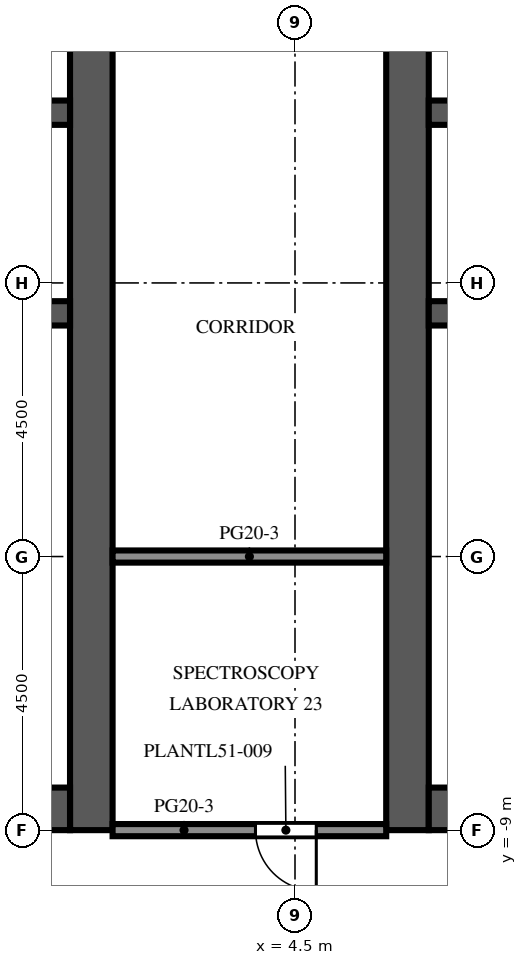
"""IFC4 building model, lengths in metres.
Left out: names, types, materials, properties, quantities, classifications, styles, units other than length and angle.
Written with IfcOpenShell. Run it as: python <this file> out.ifc"""

import sys

from ifc_helpers import new_model, si_unit, direction, frame, frame_2d, origin, place, context, subcontext, project, spatial, rectangle, extrude, element, fill, save


model = new_model("IFC4")
c1 = context("Model", 3, precision=1e-05, world=origin(), true_north=direction((0.0, 1.0)))
c2 = subcontext(c1, "Body", "Model", "MODEL_VIEW")
j1 = project(units=[si_unit("LENGTHUNIT", "METRE"), si_unit("PLANEANGLEUNIT", "RADIAN")], contexts=[c1])
p1 = place(None, origin())
s1 = spatial("IfcSite", under=j1, at=p1, CompositionType="ELEMENT")
p2 = place(p1, origin())
s2 = spatial("IfcBuilding", under=s1, at=p2, CompositionType="ELEMENT")
p3 = place(p2, frame((0.0, 0.0, 226.2)))
s3 = spatial("IfcBuildingStorey", under=s2, at=p3, CompositionType="ELEMENT", Elevation=226.2)
p4 = place(p3, frame((1.15, -9.0, 0.0), z_axis=(0.0, 0.0, 1.0), x_axis=(0.0, 1.0, 0.0)))
e1 = element("IfcWall", 1, at=p4, inside=s3, PredefinedType="SHEAR", context=c2, shape_type="SweptSolid", body=[
    extrude(rectangle(XDim=27.5, YDim=0.7, at=frame_2d((13.75, 0.0))), origin(), (0.0, 0.0, 1.0), 5.4),
])
p5 = place(p4, frame((12.55, 0.0, 0.0)))
e2 = element("IfcOpeningElement", 2, at=p5, cuts=e1, PredefinedType="OPENING", context=c2, shape_type="SweptSolid", body=[
    extrude(rectangle(XDim=2.4, YDim=2.4, at=frame_2d((1.2, 1.2))), frame((0.0, 0.36, 0.0), z_axis=(0.0, -1.0, 0.0), x_axis=(1.0, 0.0, 0.0)), (0.0, 0.0, 1.0), 0.72),
])
p6 = place(p4, frame((5.46, 0.0, 0.0)))
e3 = element("IfcOpeningElement", 3, at=p6, cuts=e1, PredefinedType="OPENING", context=c2, shape_type="SweptSolid", body=[
    extrude(rectangle(XDim=0.968, YDim=2.1, at=frame_2d((0.484, 1.05))), frame((0.0, 0.36, 0.0), z_axis=(0.0, -1.0, 0.0), x_axis=(1.0, 0.0, 0.0)), (0.0, 0.0, 1.0), 0.72),
])
p7 = place(p4, frame((23.54, 0.0, 0.0)))
e4 = element("IfcOpeningElement", 4, at=p7, cuts=e1, PredefinedType="OPENING", context=c2, shape_type="SweptSolid", body=[
    extrude(rectangle(XDim=1.2, YDim=2.1, at=frame_2d((0.6, 1.05))), frame((0.0, 0.36, 0.0), z_axis=(0.0, -1.0, 0.0), x_axis=(1.0, 0.0, 0.0)), (0.0, 0.0, 1.0), 0.72),
])
p8 = place(p3, frame((-9.8, -8.65, 0.0), z_axis=(0.0, 0.0, 1.0), x_axis=(1.0, 0.0, 0.0)))
e5 = element("IfcWall", 5, at=p8, inside=s3, PredefinedType="SHEAR", context=c2, shape_type="SweptSolid", body=[
    extrude(rectangle(XDim=10.6, YDim=0.7, at=frame_2d((5.3, 0.0))), origin(), (0.0, 0.0, 1.0), 5.4),
])
p9 = place(p3, frame((-9.8, -0.5, 0.0), z_axis=(0.0, 0.0, 1.0), x_axis=(1.0, 0.0, 0.0)))
e6 = element("IfcWall", 6, at=p9, inside=s3, PredefinedType="SHEAR", context=c2, shape_type="SweptSolid", body=[
    extrude(rectangle(XDim=10.6, YDim=0.4, at=frame_2d((5.3, 0.0))), origin(), (0.0, 0.0, 1.0), 5.4),
])
p10 = place(p3, frame((-9.8, 2.8, 0.0), z_axis=(0.0, 0.0, 1.0), x_axis=(1.0, 0.0, 0.0)))
e7 = element("IfcWall", 7, at=p10, inside=s3, PredefinedType="SHEAR", context=c2, shape_type="SweptSolid", body=[
    extrude(rectangle(XDim=10.6, YDim=0.4, at=frame_2d((5.3, 0.0))), origin(), (0.0, 0.0, 1.0), 5.4),
])
p11 = place(p10, frame((0.688, 0.0, 0.0)))
e8 = element("IfcOpeningElement", 8, at=p11, cuts=e7, PredefinedType="OPENING", context=c2, shape_type="SweptSolid", body=[
    extrude(rectangle(XDim=1.1, YDim=2.1, at=frame_2d((0.55, 1.05))), frame((0.0, 0.21, 0.0), z_axis=(0.0, -1.0, 0.0), x_axis=(1.0, 0.0, 0.0)), (0.0, 0.0, 1.0), 0.42),
])
p12 = place(p10, frame((3.438, 0.0, 0.0)))
e9 = element("IfcOpeningElement", 9, at=p12, cuts=e7, PredefinedType="OPENING", context=c2, shape_type="SweptSolid", body=[
    extrude(rectangle(XDim=1.1, YDim=2.1, at=frame_2d((0.55, 1.05))), frame((0.0, 0.21, 0.0), z_axis=(0.0, -1.0, 0.0), x_axis=(1.0, 0.0, 0.0)), (0.0, 0.0, 1.0), 0.42),
])
p13 = place(p10, frame((6.113, 0.0, 0.0)))
e10 = element("IfcOpeningElement", 10, at=p13, cuts=e7, PredefinedType="OPENING", context=c2, shape_type="SweptSolid", body=[
    extrude(rectangle(XDim=1.0, YDim=2.1, at=frame_2d((0.5, 1.05))), frame((0.0, 0.21, 0.0), z_axis=(0.0, -1.0, 0.0), x_axis=(1.0, 0.0, 0.0)), (0.0, 0.0, 1.0), 0.42),
])
p14 = place(p10, frame((8.863, 0.0, 0.0)))
e11 = element("IfcOpeningElement", 11, at=p14, cuts=e7, PredefinedType="OPENING", context=c2, shape_type="SweptSolid", body=[
    extrude(rectangle(XDim=1.0, YDim=2.1, at=frame_2d((0.5, 1.05))), frame((0.0, 0.21, 0.0), z_axis=(0.0, -1.0, 0.0), x_axis=(1.0, 0.0, 0.0)), (0.0, 0.0, 1.0), 0.42),
])
p15 = place(p3, frame((6.35, -9.0, 0.0), z_axis=(0.0, 0.0, 1.0), x_axis=(0.0, 1.0, 0.0)))
e12 = element("IfcWall", 12, at=p15, inside=s3, PredefinedType="SHEAR", context=c2, shape_type="SweptSolid", body=[
    extrude(rectangle(XDim=27.5, YDim=0.7, at=frame_2d((13.75, 0.0))), origin(), (0.0, 0.0, 1.0), 5.4),
])
p16 = place(p15, frame((12.55, 0.0, 0.0)))
e13 = element("IfcOpeningElement", 13, at=p16, cuts=e12, PredefinedType="OPENING", context=c2, shape_type="SweptSolid", body=[
    extrude(rectangle(XDim=2.4, YDim=2.4, at=frame_2d((1.2, 1.2))), frame((0.0, 0.36, 0.0), z_axis=(0.0, -1.0, 0.0), x_axis=(1.0, 0.0, 0.0)), (0.0, 0.0, 1.0), 0.72),
])
p17 = place(p15, frame((5.46, 0.0, 0.0)))
e14 = element("IfcOpeningElement", 14, at=p17, cuts=e12, PredefinedType="OPENING", context=c2, shape_type="SweptSolid", body=[
    extrude(rectangle(XDim=0.968, YDim=2.1, at=frame_2d((0.484, 1.05))), frame((0.0, 0.36, 0.0), z_axis=(0.0, -1.0, 0.0), x_axis=(1.0, 0.0, 0.0)), (0.0, 0.0, 1.0), 0.72),
])
p18 = place(p15, frame((23.54, 0.0, 0.0)))
e15 = element("IfcOpeningElement", 15, at=p18, cuts=e12, PredefinedType="OPENING", context=c2, shape_type="SweptSolid", body=[
    extrude(rectangle(XDim=1.2, YDim=2.1, at=frame_2d((0.6, 1.05))), frame((0.0, 0.36, 0.0), z_axis=(0.0, -1.0, 0.0), x_axis=(1.0, 0.0, 0.0)), (0.0, 0.0, 1.0), 0.72),
])
p19 = place(p3, frame((6.7, -8.65, 0.0), z_axis=(0.0, 0.0, 1.0), x_axis=(1.0, 0.0, 0.0)))
e16 = element("IfcWall", 16, at=p19, inside=s3, PredefinedType="SHEAR", context=c2, shape_type="SweptSolid", body=[
    extrude(rectangle(XDim=10.6, YDim=0.7, at=frame_2d((5.3, 0.0))), origin(), (0.0, 0.0, 1.0), 5.4),
])
p20 = place(p3, frame((6.7, -0.5, 0.0), z_axis=(0.0, 0.0, 1.0), x_axis=(1.0, 0.0, 0.0)))
e17 = element("IfcWall", 17, at=p20, inside=s3, PredefinedType="SHEAR", context=c2, shape_type="SweptSolid", body=[
    extrude(rectangle(XDim=10.6, YDim=0.4, at=frame_2d((5.3, 0.0))), origin(), (0.0, 0.0, 1.0), 5.4),
])
p21 = place(p3, frame((6.7, 2.8, 0.0), z_axis=(0.0, 0.0, 1.0), x_axis=(1.0, 0.0, 0.0)))
e18 = element("IfcWall", 18, at=p21, inside=s3, PredefinedType="SHEAR", context=c2, shape_type="SweptSolid", body=[
    extrude(rectangle(XDim=10.6, YDim=0.4, at=frame_2d((5.3, 0.0))), origin(), (0.0, 0.0, 1.0), 5.4),
])
p22 = place(p21, frame((0.688, 0.0, 0.0)))
e19 = element("IfcOpeningElement", 19, at=p22, cuts=e18, PredefinedType="OPENING", context=c2, shape_type="SweptSolid", body=[
    extrude(rectangle(XDim=1.1, YDim=2.1, at=frame_2d((0.55, 1.05))), frame((0.0, 0.21, 0.0), z_axis=(0.0, -1.0, 0.0), x_axis=(1.0, 0.0, 0.0)), (0.0, 0.0, 1.0), 0.42),
])
p23 = place(p21, frame((3.438, 0.0, 0.0)))
e20 = element("IfcOpeningElement", 20, at=p23, cuts=e18, PredefinedType="OPENING", context=c2, shape_type="SweptSolid", body=[
    extrude(rectangle(XDim=1.1, YDim=2.1, at=frame_2d((0.55, 1.05))), frame((0.0, 0.21, 0.0), z_axis=(0.0, -1.0, 0.0), x_axis=(1.0, 0.0, 0.0)), (0.0, 0.0, 1.0), 0.42),
])
p24 = place(p21, frame((6.113, 0.0, 0.0)))
e21 = element("IfcOpeningElement", 21, at=p24, cuts=e18, PredefinedType="OPENING", context=c2, shape_type="SweptSolid", body=[
    extrude(rectangle(XDim=1.0, YDim=2.1, at=frame_2d((0.5, 1.05))), frame((0.0, 0.21, 0.0), z_axis=(0.0, -1.0, 0.0), x_axis=(1.0, 0.0, 0.0)), (0.0, 0.0, 1.0), 0.42),
])
p25 = place(p21, frame((8.863, 0.0, 0.0)))
e22 = element("IfcOpeningElement", 22, at=p25, cuts=e18, PredefinedType="OPENING", context=c2, shape_type="SweptSolid", body=[
    extrude(rectangle(XDim=1.0, YDim=2.1, at=frame_2d((0.5, 1.05))), frame((0.0, 0.21, 0.0), z_axis=(0.0, -1.0, 0.0), x_axis=(1.0, 0.0, 0.0)), (0.0, 0.0, 1.0), 0.42),
])
p26 = place(p3, frame((-1.75, -3.74, 0.0), z_axis=(0.0, 0.0, 1.0), x_axis=(1.0, 0.0, 0.0)))
e23 = element("IfcWall", 23, at=p26, inside=s3, PredefinedType="PARTITIONING", context=c2, shape_type="SweptSolid", body=[
    extrude(rectangle(XDim=2.55, YDim=0.1, at=frame_2d((1.275, 0.0))), origin(), (0.0, 0.0, 1.0), 4.95),
])
p27 = place(p26, frame((0.775, 0.0, 0.0)))
e24 = element("IfcOpeningElement", 24, at=p27, cuts=e23, PredefinedType="OPENING", context=c2, shape_type="SweptSolid", body=[
    extrude(rectangle(XDim=1.0, YDim=2.1, at=frame_2d((0.5, 1.05))), frame((0.0, 0.06, 0.0), z_axis=(0.0, -1.0, 0.0), x_axis=(1.0, 0.0, 0.0)), (0.0, 0.0, 1.0), 0.12),
])
p28 = place(p3, frame((-1.75, -2.372, 0.0), z_axis=(0.0, 0.0, 1.0), x_axis=(1.0, 0.0, 0.0)))
e25 = element("IfcWall", 25, at=p28, inside=s3, PredefinedType="PARTITIONING", context=c2, shape_type="SweptSolid", body=[
    extrude(rectangle(XDim=2.55, YDim=0.1, at=frame_2d((1.275, 0.0))), origin(), (0.0, 0.0, 1.0), 4.95),
])
p29 = place(p28, frame((0.775, 0.0, 0.0)))
e26 = element("IfcOpeningElement", 26, at=p29, cuts=e25, PredefinedType="OPENING", context=c2, shape_type="SweptSolid", body=[
    extrude(rectangle(XDim=1.0, YDim=2.1, at=frame_2d((0.5, 1.05))), frame((0.0, 0.06, 0.0), z_axis=(0.0, -1.0, 0.0), x_axis=(1.0, 0.0, 0.0)), (0.0, 0.0, 1.0), 0.12),
])
p30 = place(p3, frame((6.7, -3.74, 0.0), z_axis=(0.0, 0.0, 1.0), x_axis=(1.0, 0.0, 0.0)))
e27 = element("IfcWall", 27, at=p30, inside=s3, PredefinedType="PARTITIONING", context=c2, shape_type="SweptSolid", body=[
    extrude(rectangle(XDim=2.55, YDim=0.1, at=frame_2d((1.275, 0.0))), origin(), (0.0, 0.0, 1.0), 4.95),
])
p31 = place(p30, frame((0.775, 0.0, 0.0)))
e28 = element("IfcOpeningElement", 28, at=p31, cuts=e27, PredefinedType="OPENING", context=c2, shape_type="SweptSolid", body=[
    extrude(rectangle(XDim=1.0, YDim=2.1, at=frame_2d((0.5, 1.05))), frame((0.0, 0.06, 0.0), z_axis=(0.0, -1.0, 0.0), x_axis=(1.0, 0.0, 0.0)), (0.0, 0.0, 1.0), 0.12),
])
p32 = place(p3, frame((6.7, -2.372, 0.0), z_axis=(0.0, 0.0, 1.0), x_axis=(1.0, 0.0, 0.0)))
e29 = element("IfcWall", 29, at=p32, inside=s3, PredefinedType="PARTITIONING", context=c2, shape_type="SweptSolid", body=[
    extrude(rectangle(XDim=2.55, YDim=0.1, at=frame_2d((1.275, 0.0))), origin(), (0.0, 0.0, 1.0), 4.95),
])
p33 = place(p32, frame((0.775, 0.0, 0.0)))
e30 = element("IfcOpeningElement", 30, at=p33, cuts=e29, PredefinedType="OPENING", context=c2, shape_type="SweptSolid", body=[
    extrude(rectangle(XDim=1.0, YDim=2.1, at=frame_2d((0.5, 1.05))), frame((0.0, 0.06, 0.0), z_axis=(0.0, -1.0, 0.0), x_axis=(1.0, 0.0, 0.0)), (0.0, 0.0, 1.0), 0.12),
])
p34 = place(p3, frame((1.5, -9.0, 0.0), z_axis=(0.0, 0.0, 1.0), x_axis=(1.0, 0.0, 0.0)))
e31 = element("IfcWall", 31, at=p34, inside=s3, PredefinedType="PARTITIONING", context=c2, shape_type="SweptSolid", body=[
    extrude(rectangle(XDim=4.5, YDim=0.2, at=frame_2d((2.25, 0.0))), origin(), (0.0, 0.0, 1.0), 4.95),
])
p35 = place(p34, frame((2.35, 0.0, 0.0)))
e32 = element("IfcOpeningElement", 32, at=p35, cuts=e31, PredefinedType="OPENING", context=c2, shape_type="SweptSolid", body=[
    extrude(rectangle(XDim=1.0, YDim=2.1, at=frame_2d((0.5, 1.05))), frame((0.0, 0.11, 0.0), z_axis=(0.0, -1.0, 0.0), x_axis=(1.0, 0.0, 0.0)), (0.0, 0.0, 1.0), 0.22),
])
p36 = place(p3, frame((1.5, -4.5, 0.0), z_axis=(0.0, 0.0, 1.0), x_axis=(1.0, 0.0, 0.0)))
e33 = element("IfcWall", 33, at=p36, inside=s3, PredefinedType="PARTITIONING", context=c2, shape_type="SweptSolid", body=[
    extrude(rectangle(XDim=4.5, YDim=0.2, at=frame_2d((2.25, 0.0))), origin(), (0.0, 0.0, 1.0), 4.95),
])
p37 = place(p5, origin())
e34 = element("IfcDoor", 34, at=p37, inside=s3, OperationType="DOUBLE_DOOR_DOUBLE_SWING", PredefinedType="DOOR", context=c2, shape_type="SweptSolid", body=[
    extrude(rectangle(XDim=2.4, YDim=2.4, at=frame_2d((1.2, 1.2))), frame((0.0, 0.025, 0.0), z_axis=(0.0, -1.0, 0.0), x_axis=(1.0, 0.0, 0.0)), (0.0, 0.0, 1.0), 0.05),
])
fill(e2, e34)
p38 = place(p16, origin())
e35 = element("IfcDoor", 35, at=p38, inside=s3, OperationType="DOUBLE_DOOR_DOUBLE_SWING", PredefinedType="DOOR", context=c2, shape_type="SweptSolid", body=[
    extrude(rectangle(XDim=2.4, YDim=2.4, at=frame_2d((1.2, 1.2))), frame((0.0, 0.025, 0.0), z_axis=(0.0, -1.0, 0.0), x_axis=(1.0, 0.0, 0.0)), (0.0, 0.0, 1.0), 0.05),
])
fill(e13, e35)
p39 = place(p6, origin())
e36 = element("IfcDoor", 36, at=p39, inside=s3, OperationType="SINGLE_SWING_LEFT", PredefinedType="DOOR", context=c2, shape_type="SweptSolid", body=[
    extrude(rectangle(XDim=0.968, YDim=2.1, at=frame_2d((0.484, 1.05))), frame((0.0, 0.325, 0.0), z_axis=(0.0, -1.0, 0.0), x_axis=(1.0, 0.0, 0.0)), (0.0, 0.0, 1.0), 0.05),
])
fill(e3, e36)
p40 = place(p17, origin())
e37 = element("IfcDoor", 37, at=p40, inside=s3, OperationType="SINGLE_SWING_RIGHT", PredefinedType="DOOR", context=c2, shape_type="SweptSolid", body=[
    extrude(rectangle(XDim=0.968, YDim=2.1, at=frame_2d((0.484, 1.05))), frame((0.0, -0.275, 0.0), z_axis=(0.0, -1.0, 0.0), x_axis=(1.0, 0.0, 0.0)), (0.0, 0.0, 1.0), 0.05),
])
fill(e14, e37)
p41 = place(p35, origin())
e38 = element("IfcDoor", 38, at=p41, inside=s3, OperationType="SINGLE_SWING_RIGHT", PredefinedType="DOOR", context=c2, shape_type="SweptSolid", body=[
    extrude(rectangle(XDim=1.0, YDim=2.1, at=frame_2d((0.5, 1.05))), frame((0.0, 0.025, 0.0), z_axis=(0.0, -1.0, 0.0), x_axis=(1.0, 0.0, 0.0)), (0.0, 0.0, 1.0), 0.05),
])
fill(e32, e38)
save(model, sys.argv[1])
